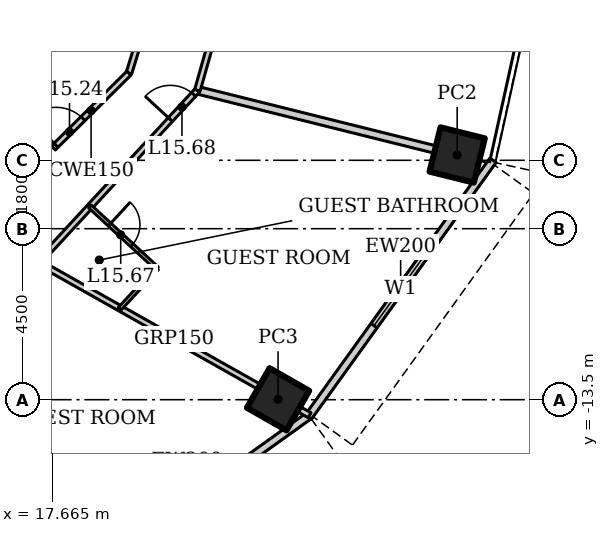
"""IFC4 building model, lengths in metres.
Left out: names, types, materials, properties, quantities, classifications, styles, units other than length and angle.
Written with IfcOpenShell. Run it as: python <this file> out.ifc"""

import sys

from ifc_helpers import new_model, si_unit, direction, frame, frame_2d, origin, origin_2d, place, context, subcontext, project, spatial, rectangle, hollow_rectangle, extrude, element, fill, save


model = new_model("IFC4")
c1 = context("Model", 3, precision=1e-05, world=origin(), true_north=direction((0.0, 1.0)))
c2 = subcontext(c1, "Body", "Model", "MODEL_VIEW")
j1 = project(units=[si_unit("LENGTHUNIT", "METRE"), si_unit("PLANEANGLEUNIT", "RADIAN")], contexts=[c1])
p1 = place(None, origin())
s1 = spatial("IfcSite", under=j1, at=p1, CompositionType="ELEMENT")
p2 = place(p1, origin())
s2 = spatial("IfcBuilding", under=s1, at=p2, CompositionType="ELEMENT")
p3 = place(p2, frame((0.0, 0.0, 69.4)))
s3 = spatial("IfcBuildingStorey", under=s2, at=p3, CompositionType="ELEMENT", Elevation=69.4)
p4 = place(p3, frame((23.605, -13.489, 0.0), z_axis=(0.0, 0.0, 1.0), x_axis=(0.496139221777, 0.86824298017, 0.0)))
e1 = element("IfcColumn", 1, at=p4, inside=s3, PredefinedType="COLUMN", context=c2, shape_type="SweptSolid", body=[
    extrude(hollow_rectangle(XDim=1.2, YDim=1.2, WallThickness=0.12, at=origin_2d()), origin(), (0.0, 0.0, 1.0), 3.6),
])
p5 = place(p3, frame((28.318, -7.06, 0.0), z_axis=(0.0, 0.0, 1.0), x_axis=(0.2419218956, 0.970295726276, 0.0)))
e2 = element("IfcColumn", 2, at=p5, inside=s3, PredefinedType="COLUMN", context=c2, shape_type="SweptSolid", body=[
    extrude(hollow_rectangle(XDim=1.2, YDim=1.2, WallThickness=0.1, at=origin_2d()), origin(), (0.0, 0.0, 1.0), 3.6),
])
p6 = place(p3, frame((17.929, -18.572, 0.0), z_axis=(0.0, 0.0, 1.0), x_axis=(0.812791321576, 0.582554948112, 0.0)))
e3 = element("IfcWall", 3, at=p6, inside=s3, PredefinedType="SOLIDWALL", context=c2, shape_type="SweptSolid", body=[
    extrude(rectangle(XDim=8.063, YDim=0.2, at=frame_2d((4.032, 0.0))), origin(), (0.0, 0.0, 1.0), 3.45),
])
p7 = place(p6, frame((2.832, 0.0, 0.5)))
e4 = element("IfcOpeningElement", 4, at=p7, cuts=e3, PredefinedType="OPENING", context=c2, shape_type="SweptSolid", body=[
    extrude(rectangle(XDim=2.4, YDim=2.2, at=frame_2d((1.2, 1.1))), frame((0.0, 0.11, 0.0), z_axis=(0.0, -1.0, 0.0), x_axis=(1.0, 0.0, 0.0)), (0.0, 0.0, 1.0), 0.22),
])
p8 = place(p3, frame((24.4, -13.957, 0.0), z_axis=(0.0, 0.0, 1.0), x_axis=(0.583937613703, 0.811798536155, 0.0)))
e5 = element("IfcWall", 5, at=p8, inside=s3, PredefinedType="SOLIDWALL", context=c2, shape_type="SweptSolid", body=[
    extrude(rectangle(XDim=8.323, YDim=0.2, at=frame_2d((4.162, 0.0))), origin(), (0.0, 0.0, 1.0), 3.45),
])
p9 = place(p8, frame((2.961, 0.0, 0.5)))
e6 = element("IfcOpeningElement", 6, at=p9, cuts=e5, PredefinedType="OPENING", context=c2, shape_type="SweptSolid", body=[
    extrude(rectangle(XDim=2.4, YDim=2.2, at=frame_2d((1.2, 1.1))), frame((0.0, 0.11, 0.0), z_axis=(0.0, -1.0, 0.0), x_axis=(1.0, 0.0, 0.0)), (0.0, 0.0, 1.0), 0.22),
])
p10 = place(p3, frame((17.97, -18.542, 0.0), z_axis=(0.0, 0.0, 1.0), x_axis=(-0.698757291878, 0.715358823981, 0.0)))
e7 = element("IfcWall", 7, at=p10, inside=s3, PredefinedType="PARTITIONING", context=c2, shape_type="SweptSolid", body=[
    extrude(rectangle(XDim=8.177, YDim=0.15, at=frame_2d((4.088, 0.0))), origin(), (0.0, 0.0, 1.0), 2.528),
])
p11 = place(p3, frame((24.435, -13.909, 0.0), z_axis=(0.0, 0.0, 1.0), x_axis=(-0.871075246657, 0.491149584813, 0.0)))
e8 = element("IfcWall", 8, at=p11, inside=s3, PredefinedType="PARTITIONING", context=c2, shape_type="SweptSolid", body=[
    extrude(rectangle(XDim=8.192, YDim=0.15, at=frame_2d((4.096, 0.0))), origin(), (0.0, 0.0, 1.0), 2.693),
])
p12 = place(p3, frame((27.833, -6.939, 0.0), z_axis=(0.0, 0.0, 1.0), x_axis=(-0.970295936837, 0.241921051083, 0.0)))
e9 = element("IfcWall", 9, at=p12, inside=s3, PredefinedType="SOLIDWALL", context=c2, shape_type="SweptSolid", body=[
    extrude(rectangle(XDim=6.543, YDim=0.2, at=frame_2d((3.272, 0.0))), origin(), (0.0, 0.0, 1.0), 2.333),
])
p13 = place(p3, frame((17.299, -9.885, 0.0), z_axis=(0.0, 0.0, 1.0), x_axis=(0.678641806296, 0.734469399463, 0.0)))
e10 = element("IfcWall", 10, at=p13, inside=s3, PredefinedType="PARTITIONING", context=c2, shape_type="SweptSolid", body=[
    extrude(rectangle(XDim=6.166, YDim=0.15, at=frame_2d((3.083, 0.0))), origin(), (0.0, 0.0, 1.0), 3.45),
])
p14 = place(p13, frame((5.116, 0.0, 0.0)))
e11 = element("IfcOpeningElement", 11, at=p14, cuts=e10, PredefinedType="OPENING", context=c2, shape_type="SweptSolid", body=[
    extrude(rectangle(XDim=0.9, YDim=2.1, at=frame_2d((0.45, 1.05))), frame((0.0, 0.085, 0.0), z_axis=(0.0, -1.0, 0.0), x_axis=(1.0, 0.0, 0.0)), (0.0, 0.0, 1.0), 0.17),
])
p15 = place(p3, frame((19.681, -4.907, 0.0), z_axis=(0.0, 0.0, 1.0), x_axis=(0.295778570807, 0.955256529447, 0.0)))
e12 = element("IfcWall", 12, at=p15, inside=s3, PredefinedType="PARTITIONING", context=c2, shape_type="SweptSolid", body=[
    extrude(rectangle(XDim=4.195, YDim=0.15, at=frame_2d((2.097, 0.0))), origin(), (0.0, 0.0, 1.0), 3.45),
])
p16 = place(p3, frame((18.656, -8.416, 0.0), z_axis=(0.0, 0.0, 1.0), x_axis=(0.73447964986, -0.678630712495, 0.0)))
e13 = element("IfcWall", 13, at=p16, inside=s3, PredefinedType="PARTITIONING", context=c2, shape_type="SweptSolid", body=[
    extrude(rectangle(XDim=2.4, YDim=0.1, at=frame_2d((1.2, 0.0))), origin(), (0.0, 0.0, 1.0), 3.45),
])
p17 = place(p16, frame((0.7, 0.0, 0.0)))
e14 = element("IfcOpeningElement", 14, at=p17, cuts=e13, PredefinedType="OPENING", context=c2, shape_type="SweptSolid", body=[
    extrude(rectangle(XDim=0.8, YDim=2.1, at=frame_2d((0.4, 1.05))), frame((0.0, 0.06, 0.0), z_axis=(0.0, -1.0, 0.0), x_axis=(1.0, 0.0, 0.0)), (0.0, 0.0, 1.0), 0.12),
])
p18 = place(p3, frame((20.419, -10.045, 0.0), z_axis=(0.0, 0.0, 1.0), x_axis=(-0.67861657312, -0.734492713842, 0.0)))
e15 = element("IfcWall", 15, at=p18, inside=s3, PredefinedType="PARTITIONING", context=c2, shape_type="SweptSolid", body=[
    extrude(rectangle(XDim=1.446, YDim=0.1, at=frame_2d((0.723, 0.0))), origin(), (0.0, 0.0, 1.0), 3.45),
])
p19 = place(p3, frame((21.484, -5.356, 0.0), z_axis=(0.0, 0.0, 1.0), x_axis=(0.272386051236, 0.962188047677, 0.0)))
e16 = element("IfcWall", 16, at=p19, inside=s3, PredefinedType="ELEMENTEDWALL", context=c2, shape_type="SweptSolid", body=[
    extrude(rectangle(XDim=5.567, YDim=0.15, at=frame_2d((2.783, 0.0))), origin(), (0.0, 0.0, 1.0), 3.45),
])
p20 = place(p19, frame((1.884, 0.0, 0.0)))
e17 = element("IfcOpeningElement", 17, at=p20, cuts=e16, PredefinedType="OPENING", context=c2, shape_type="SweptSolid", body=[
    extrude(rectangle(XDim=1.8, YDim=2.1, at=frame_2d((0.9, 1.05))), frame((0.0, 0.085, 0.0), z_axis=(0.0, -1.0, 0.0), x_axis=(1.0, 0.0, 0.0)), (0.0, 0.0, 1.0), 0.17),
])
p21 = place(p3, frame((17.69, -6.876, 0.0), z_axis=(0.0, 0.0, 1.0), x_axis=(0.710845937688, 0.70334774676, 0.0)))
e18 = element("IfcWall", 18, at=p21, inside=s3, PredefinedType="PARTITIONING", context=c2, shape_type="SweptSolid", body=[
    extrude(rectangle(XDim=2.8, YDim=0.15, at=frame_2d((1.4, 0.0))), origin(), (0.0, 0.0, 1.0), 3.45),
])
p22 = place(p21, frame((0.1, 0.0, 0.0)))
e19 = element("IfcOpeningElement", 19, at=p22, cuts=e18, PredefinedType="OPENING", context=c2, shape_type="SweptSolid", body=[
    extrude(rectangle(XDim=1.0, YDim=2.1, at=frame_2d((0.5, 1.05))), frame((0.0, 0.085, 0.0), z_axis=(0.0, -1.0, 0.0), x_axis=(1.0, 0.0, 0.0)), (0.0, 0.0, 1.0), 0.17),
])
p23 = place(p9, origin())
e20 = element("IfcWindow", 20, at=p23, inside=s3, PartitioningType="SINGLE_PANEL", PredefinedType="WINDOW", context=c2, shape_type="SweptSolid", body=[
    extrude(rectangle(XDim=2.4, YDim=2.2, at=frame_2d((1.2, 1.1))), frame((0.0, 0.03, 0.0), z_axis=(0.0, -1.0, 0.0), x_axis=(1.0, 0.0, 0.0)), (0.0, 0.0, 1.0), 0.06),
])
fill(e6, e20)
p24 = place(p22, origin())
e21 = element("IfcDoor", 21, at=p24, inside=s3, OperationType="SINGLE_SWING_LEFT", PredefinedType="DOOR", context=c2, shape_type="SweptSolid", body=[
    extrude(rectangle(XDim=1.0, YDim=2.1, at=frame_2d((0.5, 1.05))), frame((0.0, 0.025, 0.0), z_axis=(0.0, -1.0, 0.0), x_axis=(1.0, 0.0, 0.0)), (0.0, 0.0, 1.0), 0.05),
])
fill(e19, e21)
p25 = place(p17, origin())
e22 = element("IfcDoor", 22, at=p25, inside=s3, OperationType="SINGLE_SWING_LEFT", PredefinedType="DOOR", context=c2, shape_type="SweptSolid", body=[
    extrude(rectangle(XDim=0.8, YDim=2.1, at=frame_2d((0.4, 1.05))), frame((0.0, 0.025, 0.0), z_axis=(0.0, -1.0, 0.0), x_axis=(1.0, 0.0, 0.0)), (0.0, 0.0, 1.0), 0.05),
])
fill(e14, e22)
p26 = place(p14, origin())
e23 = element("IfcDoor", 23, at=p26, inside=s3, OperationType="SINGLE_SWING_LEFT", PredefinedType="DOOR", context=c2, shape_type="SweptSolid", body=[
    extrude(rectangle(XDim=0.9, YDim=2.1, at=frame_2d((0.45, 1.05))), frame((0.0, 0.025, 0.0), z_axis=(0.0, -1.0, 0.0), x_axis=(1.0, 0.0, 0.0)), (0.0, 0.0, 1.0), 0.05),
])
fill(e11, e23)
save(model, sys.argv[1])
